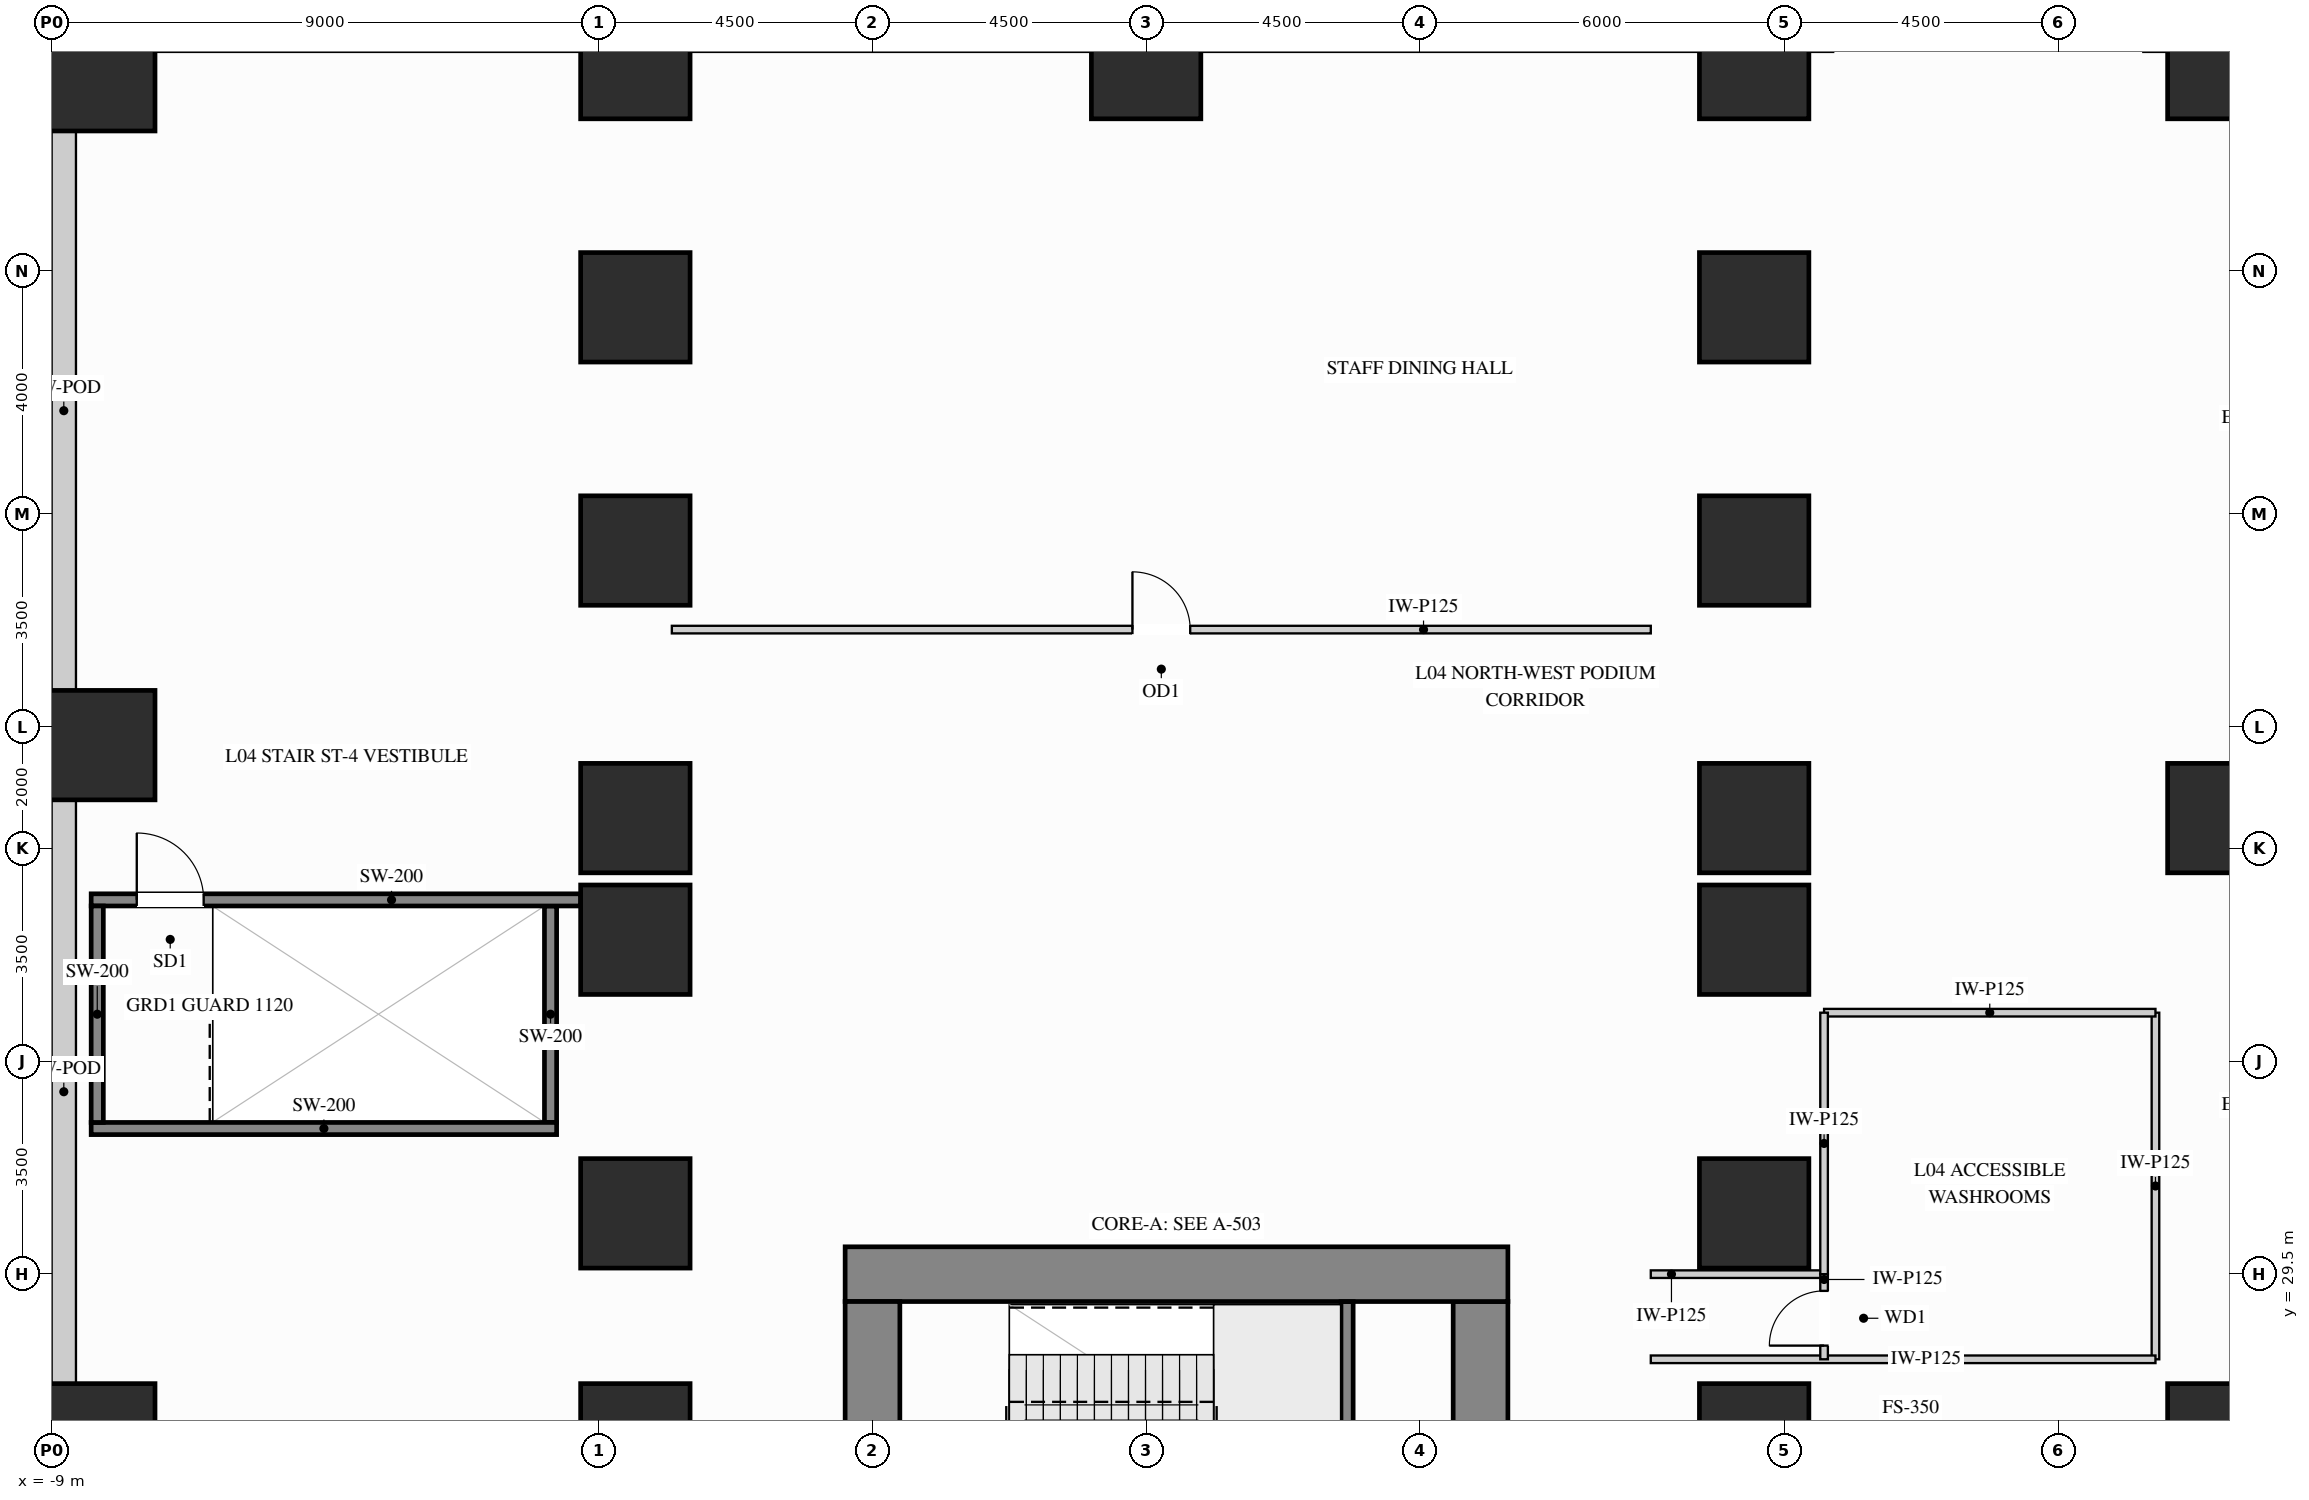
"""IFC4 building model, lengths in metres.
Left out: names, types, materials, properties, quantities, classifications, styles, units other than length and angle.
Written with IfcOpenShell. Run it as: python <this file> out.ifc"""

import sys

from ifc_helpers import new_model, si_unit, direction, frame, frame_2d, origin, origin_2d, place, context, subcontext, project, spatial, rectangle, extrude, source, transform, mapped, element, fill, save


model = new_model("IFC4")
c1 = context("Model", 3, precision=1e-05, world=origin(), true_north=direction((0.0, 1.0)))
c2 = subcontext(c1, "Body", "Model", "MODEL_VIEW")
j1 = project(units=[si_unit("LENGTHUNIT", "METRE"), si_unit("PLANEANGLEUNIT", "RADIAN")], contexts=[c1])
p1 = place(None, origin())
s1 = spatial("IfcSite", under=j1, at=p1, CompositionType="ELEMENT")
p2 = place(p1, origin())
s2 = spatial("IfcBuilding", under=s1, at=p2, CompositionType="ELEMENT")
p3 = place(p2, frame((0.0, 0.0, 18.0)))
s3 = spatial("IfcBuildingStorey", under=s2, at=p3, CompositionType="ELEMENT", Elevation=18.0)
m1 = source(origin(), c2, "Body", "SweptSolid", [
    extrude(rectangle(XDim=1.8, YDim=1.8, at=origin_2d()), origin(), (0.0, 0.0, 1.0), 4.28),
])
for number, where, z_axis, x_axis in (
    (1, (-8.2, 26.8, 0.0), (0.0, 0.0, 1.0), (1.0, 0.0, 0.0)),
    (2, (-8.2, 38.2, 0.0), (0.0, 0.0, 1.0), (1.0, 0.0, 0.0)),
    (3, (-8.2, 49.2, 0.0), (0.0, 0.0, 1.0), (1.0, 0.0, 0.0)),
    (4, (0.6, 26.8, 0.0), (0.0, 0.0, 1.0), (1.0, 0.0, 0.0)),
    (5, (0.6, 30.5, 0.0), (0.0, 0.0, 1.0), (1.0, 0.0, 0.0)),
    (6, (0.6, 35.0, 0.0), (0.0, 0.0, 1.0), (1.0, 0.0, 0.0)),
    (7, (0.6, 37.0, 0.0), (0.0, 0.0, 1.0), (1.0, 0.0, 0.0)),
    (8, (0.6, 41.4, 0.0), (0.0, 0.0, 1.0), (1.0, 0.0, 0.0)),
    (9, (0.6, 45.4, 0.0), (0.0, 0.0, 1.0), (1.0, 0.0, 0.0)),
    (10, (0.6, 49.4, 0.0), (0.0, 0.0, 1.0), (1.0, 0.0, 0.0)),
    (11, (9.0, 49.4, 0.0), (0.0, 0.0, 1.0), (1.0, 0.0, 0.0)),
    (12, (19.0, 49.4, 0.0), (0.0, 0.0, 1.0), (1.0, 0.0, 0.0)),
    (13, (26.7, 49.4, 0.0), (0.0, 0.0, 1.0), (1.0, 0.0, 0.0)),
    (14, (26.7, 26.8, 0.0), (0.0, 0.0, 1.0), (1.0, 0.0, 0.0)),
    (15, (26.7, 37.0, 0.0), (0.0, 0.0, 1.0), (1.0, 0.0, 0.0)),
    (16, (19.0, 26.8, 0.0), (0.0, 0.0, 1.0), (1.0, 0.0, 0.0)),
    (17, (19.0, 30.5, 0.0), (0.0, 0.0, 1.0), (1.0, 0.0, 0.0)),
    (18, (19.0, 35.0, 0.0), (0.0, 0.0, 1.0), (1.0, 0.0, 0.0)),
    (19, (19.0, 37.0, 0.0), (0.0, 0.0, 1.0), (1.0, 0.0, 0.0)),
    (20, (19.0, 41.4, 0.0), (0.0, 0.0, 1.0), (1.0, 0.0, 0.0)),
    (21, (19.0, 45.4, 0.0), (0.0, 0.0, 1.0), (1.0, 0.0, 0.0)),
):
    element("IfcColumn", number, at=place(p3, frame(where, z_axis=z_axis, x_axis=x_axis)), inside=s3, PredefinedType="COLUMN", context=c2, shape_type="MappedRepresentation", body=[
        mapped(m1, transform((0.0, 0.0, 0.0), x_axis=(1.0, 0.0, 0.0), y_axis=(0.0, 1.0, 0.0), z_axis=(0.0, 0.0, 1.0))),
    ])
m2 = source(origin(), c2, "Body", "SweptSolid", [
    extrude(rectangle(XDim=8.17, YDim=0.9, at=frame_2d((4.085, 0.0))), origin(), (0.0, 0.0, 1.0), 4.28),
])
p4 = place(p3, frame((14.5, 20.88, 0.0), z_axis=(0.0, 0.0, 1.0), x_axis=(0.0, 1.0, 0.0)))
e22 = element("IfcWall", 22, at=p4, inside=s3, PredefinedType="SHEAR", context=c2, shape_type="MappedRepresentation", body=[
    mapped(m2, transform((0.0, 0.0, 0.0), x_axis=(1.0, 0.0, 0.0), y_axis=(0.0, 1.0, 0.0), z_axis=(0.0, 0.0, 1.0))),
])
m3 = source(origin(), c2, "Body", "SweptSolid", [
    extrude(rectangle(XDim=10.9, YDim=0.9, at=frame_2d((5.45, 0.0))), origin(), (0.0, 0.0, 1.0), 4.28),
])
p5 = place(p3, frame((4.05, 29.5, 0.0), z_axis=(0.0, 0.0, 1.0), x_axis=(1.0, 0.0, 0.0)))
e23 = element("IfcWall", 23, at=p5, inside=s3, PredefinedType="SHEAR", context=c2, shape_type="MappedRepresentation", body=[
    mapped(m3, transform((0.0, 0.0, 0.0), x_axis=(1.0, 0.0, 0.0), y_axis=(0.0, 1.0, 0.0), z_axis=(0.0, 0.0, 1.0))),
])
m4 = source(origin(), c2, "Body", "SweptSolid", [
    extrude(rectangle(XDim=20.1, YDim=0.9, at=frame_2d((10.05, 0.0))), origin(), (0.0, 0.0, 1.0), 4.28),
])
p6 = place(p3, frame((4.5, 8.95, 0.0), z_axis=(0.0, 0.0, 1.0), x_axis=(0.0, 1.0, 0.0)))
e24 = element("IfcWall", 24, at=p6, inside=s3, PredefinedType="SHEAR", context=c2, shape_type="MappedRepresentation", body=[
    mapped(m4, transform((0.0, 0.0, 0.0), x_axis=(1.0, 0.0, 0.0), y_axis=(0.0, 1.0, 0.0), z_axis=(0.0, 0.0, 1.0))),
])
m5 = source(origin(), c2, "Body", "SweptSolid", [
    extrude(rectangle(XDim=9.204, YDim=0.4, at=frame_2d((4.602, 0.0))), origin(), (0.0, 0.0, 1.0), 1.865),
])
p7 = place(p3, frame((-8.8, 48.302, 0.0), z_axis=(0.0, 0.0, 1.0), x_axis=(0.0, -1.0, 0.0)))
e25 = element("IfcWall", 25, at=p7, inside=s3, PredefinedType="SOLIDWALL", context=c2, shape_type="MappedRepresentation", body=[
    mapped(m5, transform((0.0, 0.0, 0.0), x_axis=(1.0, 0.0, 0.0), y_axis=(0.0, 1.0, 0.0), z_axis=(0.0, 0.0, 1.0))),
])
m6 = source(origin(), c2, "Body", "SweptSolid", [
    extrude(rectangle(XDim=9.604, YDim=0.4, at=frame_2d((4.802, 0.0))), origin(), (0.0, 0.0, 1.0), 1.865),
])
p8 = place(p3, frame((-8.8, 37.302, 0.0), z_axis=(0.0, 0.0, 1.0), x_axis=(0.0, -1.0, 0.0)))
e26 = element("IfcWall", 26, at=p8, inside=s3, PredefinedType="SOLIDWALL", context=c2, shape_type="MappedRepresentation", body=[
    mapped(m6, transform((0.0, 0.0, 0.0), x_axis=(1.0, 0.0, 0.0), y_axis=(0.0, 1.0, 0.0), z_axis=(0.0, 0.0, 1.0))),
])
p9 = place(p3, frame((1.2, 40.1, 0.0), z_axis=(0.0, 0.0, 1.0), x_axis=(1.0, 0.0, 0.0)))
e27 = element("IfcWall", 27, at=p9, inside=s3, PredefinedType="PARTITIONING", context=c2, shape_type="SweptSolid", body=[
    extrude(rectangle(XDim=16.1, YDim=0.125, at=frame_2d((8.05, 0.0))), origin(), (0.0, 0.0, 1.0), 4.265),
])
p10 = place(p9, frame((7.575, 0.0, 0.0)))
e28 = element("IfcOpeningElement", 28, at=p10, cuts=e27, PredefinedType="OPENING", context=c2, shape_type="SweptSolid", body=[
    extrude(rectangle(XDim=0.95, YDim=2.15, at=frame_2d((0.475, 1.075))), frame((0.0, 0.073, 0.0), z_axis=(0.0, -1.0, 0.0), x_axis=(1.0, 0.0, 0.0)), (0.0, 0.0, 1.0), 0.145),
])
m7 = source(origin(), c2, "Body", "SweptSolid", [
    extrude(rectangle(XDim=5.7, YDim=0.125, at=frame_2d((2.85, 0.0))), origin(), (0.0, 0.0, 1.0), 4.265),
])
p11 = place(p3, frame((25.6, 28.1, 0.0), z_axis=(0.0, 0.0, 1.0), x_axis=(0.0, 1.0, 0.0)))
e29 = element("IfcWall", 29, at=p11, inside=s3, PredefinedType="PARTITIONING", context=c2, shape_type="MappedRepresentation", body=[
    mapped(m7, transform((0.0, 0.0, 0.0), x_axis=(1.0, 0.0, 0.0), y_axis=(0.0, 1.0, 0.0), z_axis=(0.0, 0.0, 1.0))),
])
m8 = source(origin(), c2, "Body", "SweptSolid", [
    extrude(rectangle(XDim=2.85, YDim=0.125, at=frame_2d((1.425, 0.0))), origin(), (0.0, 0.0, 1.0), 4.265),
])
p12 = place(p3, frame((17.3, 29.5, 0.0), z_axis=(0.0, 0.0, 1.0), x_axis=(1.0, 0.0, 0.0)))
e30 = element("IfcWall", 30, at=p12, inside=s3, PredefinedType="PARTITIONING", context=c2, shape_type="MappedRepresentation", body=[
    mapped(m8, transform((0.0, 0.0, 0.0), x_axis=(1.0, 0.0, 0.0), y_axis=(0.0, 1.0, 0.0), z_axis=(0.0, 0.0, 1.0))),
])
m9 = source(origin(), c2, "Body", "SweptSolid", [
    extrude(rectangle(XDim=5.45, YDim=0.125, at=frame_2d((2.725, 0.0))), origin(), (0.0, 0.0, 1.0), 4.265),
])
p13 = place(p3, frame((20.15, 33.8, 0.0), z_axis=(0.0, 0.0, 1.0), x_axis=(1.0, 0.0, 0.0)))
e31 = element("IfcWall", 31, at=p13, inside=s3, PredefinedType="PARTITIONING", context=c2, shape_type="MappedRepresentation", body=[
    mapped(m9, transform((0.0, 0.0, 0.0), x_axis=(1.0, 0.0, 0.0), y_axis=(0.0, 1.0, 0.0), z_axis=(0.0, 0.0, 1.0))),
])
m10 = source(origin(), c2, "Body", "SweptSolid", [
    extrude(rectangle(XDim=8.3, YDim=0.125, at=frame_2d((4.15, 0.0))), origin(), (0.0, 0.0, 1.0), 4.265),
])
p14 = place(p3, frame((17.3, 28.1, 0.0), z_axis=(0.0, 0.0, 1.0), x_axis=(1.0, 0.0, 0.0)))
e32 = element("IfcWall", 32, at=p14, inside=s3, PredefinedType="PARTITIONING", context=c2, shape_type="MappedRepresentation", body=[
    mapped(m10, transform((0.0, 0.0, 0.0), x_axis=(1.0, 0.0, 0.0), y_axis=(0.0, 1.0, 0.0), z_axis=(0.0, 0.0, 1.0))),
])
m11 = source(origin(), c2, "Body", "SweptSolid", [
    extrude(rectangle(XDim=4.3, YDim=0.125, at=frame_2d((2.15, 0.0))), origin(), (0.0, 0.0, 1.0), 4.265),
])
p15 = place(p3, frame((20.15, 29.5, 0.0), z_axis=(0.0, 0.0, 1.0), x_axis=(0.0, 1.0, 0.0)))
e33 = element("IfcWall", 33, at=p15, inside=s3, PredefinedType="PARTITIONING", context=c2, shape_type="MappedRepresentation", body=[
    mapped(m11, transform((0.0, 0.0, 0.0), x_axis=(1.0, 0.0, 0.0), y_axis=(0.0, 1.0, 0.0), z_axis=(0.0, 0.0, 1.0))),
])
p16 = place(p3, frame((20.15, 28.1, 0.0), z_axis=(0.0, 0.0, 1.0), x_axis=(0.0, 1.0, 0.0)))
e34 = element("IfcWall", 34, at=p16, inside=s3, PredefinedType="PARTITIONING", context=c2, shape_type="SweptSolid", body=[
    extrude(rectangle(XDim=1.4, YDim=0.125, at=frame_2d((0.7, 0.0))), origin(), (0.0, 0.0, 1.0), 4.265),
])
p17 = place(p16, frame((0.225, 0.0, 0.0)))
e35 = element("IfcOpeningElement", 35, at=p17, cuts=e34, PredefinedType="OPENING", context=c2, shape_type="SweptSolid", body=[
    extrude(rectangle(XDim=0.9, YDim=2.15, at=frame_2d((0.45, 1.075))), frame((0.0, 0.073, 0.0), z_axis=(0.0, -1.0, 0.0), x_axis=(1.0, 0.0, 0.0)), (0.0, 0.0, 1.0), 0.145),
])
m12 = source(origin(), c2, "Body", "SweptSolid", [
    extrude(rectangle(XDim=3.603, YDim=0.2, at=frame_2d((1.802, 0.0))), origin(), (0.0, 0.0, 1.0), 4.28),
])
p18 = place(p3, frame((12.305, 25.445, 0.0), z_axis=(0.0, 0.0, 1.0), x_axis=(0.0, 1.0, 0.0)))
e36 = element("IfcWall", 36, at=p18, inside=s3, PredefinedType="SHEAR", context=c2, shape_type="MappedRepresentation", body=[
    mapped(m12, transform((0.0, 0.0, 0.0), x_axis=(1.0, 0.0, 0.0), y_axis=(0.0, 1.0, 0.0), z_axis=(0.0, 0.0, 1.0))),
])
m13 = source(origin(), c2, "Body", "SweptSolid", [
    extrude(rectangle(XDim=3.56, YDim=0.2, at=frame_2d((1.78, 0.0))), origin(), (0.0, 0.0, 1.0), 4.28),
])
p19 = place(p3, frame((-0.795, 31.995, 0.0), z_axis=(0.0, 0.0, 1.0), x_axis=(0.0, 1.0, 0.0)))
e37 = element("IfcWall", 37, at=p19, inside=s3, PredefinedType="SHEAR", context=c2, shape_type="MappedRepresentation", body=[
    mapped(m13, transform((0.0, 0.0, 0.0), x_axis=(1.0, 0.0, 0.0), y_axis=(0.0, 1.0, 0.0), z_axis=(0.0, 0.0, 1.0))),
])
p20 = place(p3, frame((-8.35, 35.655, 0.0), z_axis=(0.0, 0.0, 1.0), x_axis=(1.0, 0.0, 0.0)))
e38 = element("IfcWall", 38, at=p20, inside=s3, PredefinedType="SHEAR", context=c2, shape_type="SweptSolid", body=[
    extrude(rectangle(XDim=8.05, YDim=0.2, at=frame_2d((4.025, 0.0))), origin(), (0.0, 0.0, 1.0), 4.28),
])
p21 = place(p20, frame((0.75, 0.0, 0.0)))
e39 = element("IfcOpeningElement", 39, at=p21, cuts=e38, PredefinedType="OPENING", context=c2, shape_type="SweptSolid", body=[
    extrude(rectangle(XDim=1.1, YDim=2.15, at=frame_2d((0.55, 1.075))), frame((0.0, 0.11, 0.0), z_axis=(0.0, -1.0, 0.0), x_axis=(1.0, 0.0, 0.0)), (0.0, 0.0, 1.0), 0.22),
])
m14 = source(origin(), c2, "Body", "SweptSolid", [
    extrude(rectangle(XDim=7.655, YDim=0.2, at=frame_2d((3.828, 0.0))), origin(), (0.0, 0.0, 1.0), 4.28),
])
p22 = place(p3, frame((-8.35, 31.895, 0.0), z_axis=(0.0, 0.0, 1.0), x_axis=(1.0, 0.0, 0.0)))
e40 = element("IfcWall", 40, at=p22, inside=s3, PredefinedType="SHEAR", context=c2, shape_type="MappedRepresentation", body=[
    mapped(m14, transform((0.0, 0.0, 0.0), x_axis=(1.0, 0.0, 0.0), y_axis=(0.0, 1.0, 0.0), z_axis=(0.0, 0.0, 1.0))),
])
p23 = place(p3, frame((-8.25, 31.995, 0.0), z_axis=(0.0, 0.0, 1.0), x_axis=(0.0, 1.0, 0.0)))
e41 = element("IfcWall", 41, at=p23, inside=s3, PredefinedType="SHEAR", context=c2, shape_type="MappedRepresentation", body=[
    mapped(m13, transform((0.0, 0.0, 0.0), x_axis=(1.0, 0.0, 0.0), y_axis=(0.0, 1.0, 0.0), z_axis=(0.0, 0.0, 1.0))),
])
m15 = source(origin(), c2, "Body", "SweptSolid", [
    extrude(rectangle(XDim=0.95, YDim=2.15, at=frame_2d((0.475, 1.075))), frame((0.0, 0.025, 0.0), z_axis=(0.0, -1.0, 0.0), x_axis=(1.0, 0.0, 0.0)), (0.0, 0.0, 1.0), 0.05),
])
p24 = place(p10, origin())
e42 = element("IfcDoor", 42, at=p24, inside=s3, OperationType="SINGLE_SWING_LEFT", PredefinedType="DOOR", context=c2, shape_type="MappedRepresentation", body=[
    mapped(m15, transform((0.0, 0.0, 0.0), x_axis=(1.0, 0.0, 0.0), y_axis=(0.0, 1.0, 0.0), z_axis=(0.0, 0.0, 1.0))),
])
fill(e28, e42)
m16 = source(origin(), c2, "Body", "SweptSolid", [
    extrude(rectangle(XDim=1.1, YDim=2.15, at=frame_2d((0.55, 1.075))), frame((0.0, 0.025, 0.0), z_axis=(0.0, -1.0, 0.0), x_axis=(1.0, 0.0, 0.0)), (0.0, 0.0, 1.0), 0.05),
])
p25 = place(p21, origin())
e43 = element("IfcDoor", 43, at=p25, inside=s3, OperationType="SINGLE_SWING_LEFT", PredefinedType="DOOR", context=c2, shape_type="MappedRepresentation", body=[
    mapped(m16, transform((0.0, 0.0, 0.0), x_axis=(1.0, 0.0, 0.0), y_axis=(0.0, 1.0, 0.0), z_axis=(0.0, 0.0, 1.0))),
])
fill(e39, e43)
m17 = source(origin(), c2, "Body", "SweptSolid", [
    extrude(rectangle(XDim=0.9, YDim=2.15, at=frame_2d((0.45, 1.075))), frame((0.0, 0.025, 0.0), z_axis=(0.0, -1.0, 0.0), x_axis=(1.0, 0.0, 0.0)), (0.0, 0.0, 1.0), 0.05),
])
p26 = place(p17, origin())
e44 = element("IfcDoor", 44, at=p26, inside=s3, OperationType="SINGLE_SWING_LEFT", PredefinedType="DOOR", context=c2, shape_type="MappedRepresentation", body=[
    mapped(m17, transform((0.0, 0.0, 0.0), x_axis=(1.0, 0.0, 0.0), y_axis=(0.0, 1.0, 0.0), z_axis=(0.0, 0.0, 1.0))),
])
fill(e35, e44)
save(model, sys.argv[1])
